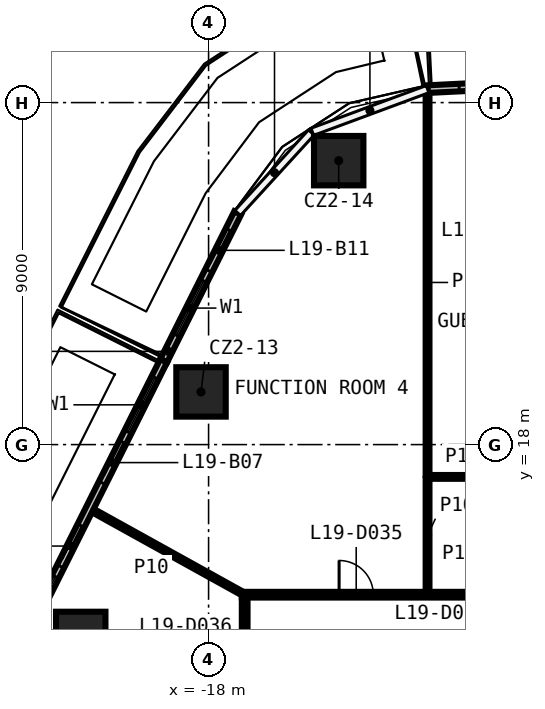
"""IFC4 building model, lengths in metres.
Left out: names, types, materials, properties, quantities, classifications, styles, units other than length and angle.
Written with IfcOpenShell. Run it as: python <this file> out.ifc"""

import sys

from ifc_helpers import new_model, si_unit, direction, frame, frame_2d, origin, origin_2d, place, context, subcontext, project, spatial, rectangle, extrude, element, fill, save


model = new_model("IFC4")
c1 = context("Model", 3, precision=1e-05, world=origin(), true_north=direction((0.0, 1.0)))
c2 = subcontext(c1, "Body", "Model", "MODEL_VIEW")
j1 = project(units=[si_unit("LENGTHUNIT", "METRE"), si_unit("PLANEANGLEUNIT", "RADIAN")], contexts=[c1])
p1 = place(None, origin())
s1 = spatial("IfcSite", under=j1, at=p1, CompositionType="ELEMENT")
p2 = place(p1, origin())
s2 = spatial("IfcBuilding", under=s1, at=p2, CompositionType="ELEMENT")
p3 = place(p2, frame((0.0, 0.0, 95.2)))
s3 = spatial("IfcBuildingStorey", under=s2, at=p3, CompositionType="ELEMENT", Elevation=95.2)
for number, where, z_axis, x_axis in (
    (1, (-21.364, 12.952, 0.0), (0.0, 0.0, 1.0), (1.0, 0.0, 0.0)),
    (2, (-18.199, 19.386, 0.0), (0.0, 0.0, 1.0), (1.0, 0.0, 0.0)),
    (3, (-14.576, 25.472, 0.0), (0.0, 0.0, 1.0), (1.0, 0.0, 0.0)),
):
    element("IfcColumn", number, at=place(p3, frame(where, z_axis=z_axis, x_axis=x_axis)), inside=s3, PredefinedType="COLUMN", context=c2, shape_type="SweptSolid", body=[
        extrude(rectangle(XDim=1.3, YDim=1.3, at=origin_2d()), origin(), (0.0, 0.0, 1.0), 3.25),
    ])
p4 = place(p3, frame((-17.125, 14.05, 0.0), z_axis=(0.0, 0.0, 1.0), x_axis=(1.0, 0.0, 0.0)))
e4 = element("IfcWall", 4, at=p4, inside=s3, PredefinedType="PARTITIONING", context=c2, shape_type="SweptSolid", body=[
    extrude(rectangle(XDim=34.25, YDim=0.15, at=frame_2d((17.125, 0.0))), origin(), (0.0, 0.0, 1.0), 3.25),
])
p5 = place(p4, frame((29.757, 0.0, 0.0)))
e5 = element("IfcOpeningElement", 5, at=p5, cuts=e4, PredefinedType="OPENING", context=c2, shape_type="SweptSolid", body=[
    extrude(rectangle(XDim=1.0, YDim=2.1, at=frame_2d((0.5, 1.05))), frame((0.0, 0.085, 0.0), z_axis=(0.0, -1.0, 0.0), x_axis=(1.0, 0.0, 0.0)), (0.0, 0.0, 1.0), 0.17),
])
p6 = place(p4, frame((18.682, 0.0, 0.0)))
e6 = element("IfcOpeningElement", 6, at=p6, cuts=e4, PredefinedType="OPENING", context=c2, shape_type="SweptSolid", body=[
    extrude(rectangle(XDim=1.0, YDim=2.1, at=frame_2d((0.5, 1.05))), frame((0.0, 0.085, 0.0), z_axis=(0.0, -1.0, 0.0), x_axis=(1.0, 0.0, 0.0)), (0.0, 0.0, 1.0), 0.17),
])
p7 = place(p4, frame((16.654, 0.0, 0.0)))
e7 = element("IfcOpeningElement", 7, at=p7, cuts=e4, PredefinedType="OPENING", context=c2, shape_type="SweptSolid", body=[
    extrude(rectangle(XDim=1.0, YDim=2.1, at=frame_2d((0.5, 1.05))), frame((0.0, 0.085, 0.0), z_axis=(0.0, -1.0, 0.0), x_axis=(1.0, 0.0, 0.0)), (0.0, 0.0, 1.0), 0.17),
])
p8 = place(p4, frame((9.827, 0.0, 0.0)))
e8 = element("IfcOpeningElement", 8, at=p8, cuts=e4, PredefinedType="OPENING", context=c2, shape_type="SweptSolid", body=[
    extrude(rectangle(XDim=1.0, YDim=2.1, at=frame_2d((0.5, 1.05))), frame((0.0, 0.085, 0.0), z_axis=(0.0, -1.0, 0.0), x_axis=(1.0, 0.0, 0.0)), (0.0, 0.0, 1.0), 0.17),
])
p9 = place(p4, frame((7.8, 0.0, 0.0)))
e9 = element("IfcOpeningElement", 9, at=p9, cuts=e4, PredefinedType="OPENING", context=c2, shape_type="SweptSolid", body=[
    extrude(rectangle(XDim=1.0, YDim=2.1, at=frame_2d((0.5, 1.05))), frame((0.0, 0.085, 0.0), z_axis=(0.0, -1.0, 0.0), x_axis=(1.0, 0.0, 0.0)), (0.0, 0.0, 1.0), 0.17),
])
p10 = place(p4, frame((2.56, 0.0, 0.0)))
e10 = element("IfcOpeningElement", 10, at=p10, cuts=e4, PredefinedType="OPENING", context=c2, shape_type="SweptSolid", body=[
    extrude(rectangle(XDim=0.9, YDim=2.1, at=frame_2d((0.45, 1.05))), frame((0.0, 0.085, 0.0), z_axis=(0.0, -1.0, 0.0), x_axis=(1.0, 0.0, 0.0)), (0.0, 0.0, 1.0), 0.17),
])
p11 = place(p3, frame((-12.238, 17.15, 0.0), z_axis=(0.0, 0.0, 1.0), x_axis=(1.0, 0.0, 0.0)))
e11 = element("IfcWall", 11, at=p11, inside=s3, PredefinedType="PARTITIONING", context=c2, shape_type="SweptSolid", body=[
    extrude(rectangle(XDim=2.45, YDim=0.1, at=frame_2d((1.225, 0.0))), origin(), (0.0, 0.0, 1.0), 3.25),
])
p12 = place(p3, frame((-12.238, 14.125, 0.0), z_axis=(0.0, 0.0, 1.0), x_axis=(0.0, 1.0, 0.0)))
e12 = element("IfcWall", 12, at=p12, inside=s3, PredefinedType="PARTITIONING", context=c2, shape_type="SweptSolid", body=[
    extrude(rectangle(XDim=2.975, YDim=0.1, at=frame_2d((1.488, 0.0))), origin(), (0.0, 0.0, 1.0), 3.25),
])
p13 = place(p3, frame((-12.238, 17.2, 0.0), z_axis=(0.0, 0.0, 1.0), x_axis=(0.0, 1.0, 0.0)))
e13 = element("IfcWall", 13, at=p13, inside=s3, PredefinedType="PARTITIONING", context=c2, shape_type="SweptSolid", body=[
    extrude(rectangle(XDim=10.133, YDim=0.1, at=frame_2d((5.067, 0.0))), origin(), (0.0, 0.0, 1.0), 3.25),
])
p14 = place(p3, frame((-17.05, -13.975, 0.0), z_axis=(0.0, 0.0, 1.0), x_axis=(0.0, 1.0, 0.0)))
e14 = element("IfcWall", 14, at=p14, inside=s3, PredefinedType="PARTITIONING", context=c2, shape_type="SweptSolid", body=[
    extrude(rectangle(XDim=27.95, YDim=0.15, at=frame_2d((13.975, 0.0))), origin(), (0.0, 0.0, 1.0), 3.25),
])
p15 = place(p14, frame((11.195, 0.0, 0.0)))
e15 = element("IfcOpeningElement", 15, at=p15, cuts=e14, PredefinedType="OPENING", context=c2, shape_type="SweptSolid", body=[
    extrude(rectangle(XDim=0.9, YDim=2.1, at=frame_2d((0.45, 1.05))), frame((0.0, 0.085, 0.0), z_axis=(0.0, -1.0, 0.0), x_axis=(1.0, 0.0, 0.0)), (0.0, 0.0, 1.0), 0.17),
])
p16 = place(p14, frame((8.57, 0.0, 0.0)))
e16 = element("IfcOpeningElement", 16, at=p16, cuts=e14, PredefinedType="OPENING", context=c2, shape_type="SweptSolid", body=[
    extrude(rectangle(XDim=0.9, YDim=2.1, at=frame_2d((0.45, 1.05))), frame((0.0, 0.085, 0.0), z_axis=(0.0, -1.0, 0.0), x_axis=(1.0, 0.0, 0.0)), (0.0, 0.0, 1.0), 0.17),
])
p17 = place(p14, frame((1.956, 0.0, 0.0)))
e17 = element("IfcOpeningElement", 17, at=p17, cuts=e14, PredefinedType="OPENING", context=c2, shape_type="SweptSolid", body=[
    extrude(rectangle(XDim=0.9, YDim=2.1, at=frame_2d((0.45, 1.05))), frame((0.0, 0.085, 0.0), z_axis=(0.0, -1.0, 0.0), x_axis=(1.0, 0.0, 0.0)), (0.0, 0.0, 1.0), 0.17),
])
p18 = place(p14, frame((25.181, 0.0, 0.0)))
e18 = element("IfcOpeningElement", 18, at=p18, cuts=e14, PredefinedType="OPENING", context=c2, shape_type="SweptSolid", body=[
    extrude(rectangle(XDim=0.9, YDim=2.1, at=frame_2d((0.45, 1.05))), frame((0.0, 0.085, 0.0), z_axis=(0.0, -1.0, 0.0), x_axis=(1.0, 0.0, 0.0)), (0.0, 0.0, 1.0), 0.17),
])
p19 = place(p14, frame((20.101, 0.0, 0.0)))
e19 = element("IfcOpeningElement", 19, at=p19, cuts=e14, PredefinedType="OPENING", context=c2, shape_type="SweptSolid", body=[
    extrude(rectangle(XDim=0.9, YDim=2.1, at=frame_2d((0.45, 1.05))), frame((0.0, 0.085, 0.0), z_axis=(0.0, -1.0, 0.0), x_axis=(1.0, 0.0, 0.0)), (0.0, 0.0, 1.0), 0.17),
])
p20 = place(p14, frame((16.206, 0.0, 0.0)))
e20 = element("IfcOpeningElement", 20, at=p20, cuts=e14, PredefinedType="OPENING", context=c2, shape_type="SweptSolid", body=[
    extrude(rectangle(XDim=0.9, YDim=2.1, at=frame_2d((0.45, 1.05))), frame((0.0, 0.085, 0.0), z_axis=(0.0, -1.0, 0.0), x_axis=(1.0, 0.0, 0.0)), (0.0, 0.0, 1.0), 0.17),
])
p21 = place(p3, frame((-21.115, 16.303, 0.0), z_axis=(0.0, 0.0, 1.0), x_axis=(0.874615252971, -0.484817655692, 0.0)))
e21 = element("IfcWall", 21, at=p21, inside=s3, PredefinedType="PARTITIONING", context=c2, shape_type="SweptSolid", body=[
    extrude(rectangle(XDim=4.648, YDim=0.1, at=frame_2d((2.324, 0.0))), origin(), (0.0, 0.0, 1.0), 3.25),
])
p22 = place(p3, frame((1.042, 28.012, 0.0), z_axis=(0.0, 0.0, 1.0), x_axis=(-0.998772222794, -0.049538338427, 0.0)))
e22 = element("IfcWall", 22, at=p22, inside=s3, PredefinedType="SOLIDWALL", context=c2, shape_type="SweptSolid", body=[
    extrude(rectangle(XDim=13.297, YDim=0.2, at=frame_2d((6.648, 0.0))), origin(), (0.0, 0.0, 1.0), 3.25),
])
p23 = place(p22, frame((2.0, 0.0, 0.6)))
e23 = element("IfcOpeningElement", 23, at=p23, cuts=e22, PredefinedType="OPENING", context=c2, shape_type="SweptSolid", body=[
    extrude(rectangle(XDim=1.6, YDim=2.4, at=frame_2d((0.8, 1.2))), frame((0.0, 0.11, 0.0), z_axis=(0.0, -1.0, 0.0), x_axis=(1.0, 0.0, 0.0)), (0.0, 0.0, 1.0), 0.22),
])
p24 = place(p22, frame((0.5, 0.0, 0.0)))
e24 = element("IfcOpeningElement", 24, at=p24, cuts=e22, PredefinedType="OPENING", context=c2, shape_type="SweptSolid", body=[
    extrude(rectangle(XDim=1.2, YDim=2.4, at=frame_2d((0.6, 1.2))), frame((0.0, 0.11, 0.0), z_axis=(0.0, -1.0, 0.0), x_axis=(1.0, 0.0, 0.0)), (0.0, 0.0, 1.0), 0.22),
])
p25 = place(p22, frame((6.432, 0.0, 0.6)))
e25 = element("IfcOpeningElement", 25, at=p25, cuts=e22, PredefinedType="OPENING", context=c2, shape_type="SweptSolid", body=[
    extrude(rectangle(XDim=1.6, YDim=2.4, at=frame_2d((0.8, 1.2))), frame((0.0, 0.11, 0.0), z_axis=(0.0, -1.0, 0.0), x_axis=(1.0, 0.0, 0.0)), (0.0, 0.0, 1.0), 0.22),
])
p26 = place(p22, frame((4.932, 0.0, 0.0)))
e26 = element("IfcOpeningElement", 26, at=p26, cuts=e22, PredefinedType="OPENING", context=c2, shape_type="SweptSolid", body=[
    extrude(rectangle(XDim=1.2, YDim=2.4, at=frame_2d((0.6, 1.2))), frame((0.0, 0.11, 0.0), z_axis=(0.0, -1.0, 0.0), x_axis=(1.0, 0.0, 0.0)), (0.0, 0.0, 1.0), 0.22),
])
p27 = place(p22, frame((9.365, 0.0, 0.6)))
e27 = element("IfcOpeningElement", 27, at=p27, cuts=e22, PredefinedType="OPENING", context=c2, shape_type="SweptSolid", body=[
    extrude(rectangle(XDim=1.6, YDim=2.4, at=frame_2d((0.8, 1.2))), frame((0.0, 0.11, 0.0), z_axis=(0.0, -1.0, 0.0), x_axis=(1.0, 0.0, 0.0)), (0.0, 0.0, 1.0), 0.22),
])
p28 = place(p22, frame((11.264, 0.0, 0.0)))
e28 = element("IfcOpeningElement", 28, at=p28, cuts=e22, PredefinedType="OPENING", context=c2, shape_type="SweptSolid", body=[
    extrude(rectangle(XDim=1.2, YDim=2.4, at=frame_2d((0.6, 1.2))), frame((0.0, 0.11, 0.0), z_axis=(0.0, -1.0, 0.0), x_axis=(1.0, 0.0, 0.0)), (0.0, 0.0, 1.0), 0.22),
])
p29 = place(p3, frame((-19.181, 20.208, 0.0), z_axis=(0.0, 0.0, 1.0), x_axis=(-0.447953166305, -0.894057023236, 0.0)))
e29 = element("IfcWall", 29, at=p29, inside=s3, PredefinedType="SOLIDWALL", context=c2, shape_type="SweptSolid", body=[
    extrude(rectangle(XDim=17.426, YDim=0.2, at=frame_2d((8.713, 0.0))), origin(), (0.0, 0.0, 1.0), 3.25),
])
p30 = place(p29, frame((0.5, 0.0, 0.6)))
e30 = element("IfcOpeningElement", 30, at=p30, cuts=e29, PredefinedType="OPENING", context=c2, shape_type="SweptSolid", body=[
    extrude(rectangle(XDim=1.6, YDim=2.4, at=frame_2d((0.8, 1.2))), frame((0.0, 0.11, 0.0), z_axis=(0.0, -1.0, 0.0), x_axis=(1.0, 0.0, 0.0)), (0.0, 0.0, 1.0), 0.22),
])
p31 = place(p29, frame((2.4, 0.0, 0.0)))
e31 = element("IfcOpeningElement", 31, at=p31, cuts=e29, PredefinedType="OPENING", context=c2, shape_type="SweptSolid", body=[
    extrude(rectangle(XDim=1.2, YDim=2.4, at=frame_2d((0.6, 1.2))), frame((0.0, 0.11, 0.0), z_axis=(0.0, -1.0, 0.0), x_axis=(1.0, 0.0, 0.0)), (0.0, 0.0, 1.0), 0.22),
])
p32 = place(p29, frame((6.357, 0.0, 0.6)))
e32 = element("IfcOpeningElement", 32, at=p32, cuts=e29, PredefinedType="OPENING", context=c2, shape_type="SweptSolid", body=[
    extrude(rectangle(XDim=1.6, YDim=2.4, at=frame_2d((0.8, 1.2))), frame((0.0, 0.11, 0.0), z_axis=(0.0, -1.0, 0.0), x_axis=(1.0, 0.0, 0.0)), (0.0, 0.0, 1.0), 0.22),
])
p33 = place(p29, frame((4.857, 0.0, 0.0)))
e33 = element("IfcOpeningElement", 33, at=p33, cuts=e29, PredefinedType="OPENING", context=c2, shape_type="SweptSolid", body=[
    extrude(rectangle(XDim=1.2, YDim=2.4, at=frame_2d((0.6, 1.2))), frame((0.0, 0.11, 0.0), z_axis=(0.0, -1.0, 0.0), x_axis=(1.0, 0.0, 0.0)), (0.0, 0.0, 1.0), 0.22),
])
p34 = place(p29, frame((10.713, 0.0, 0.6)))
e34 = element("IfcOpeningElement", 34, at=p34, cuts=e29, PredefinedType="OPENING", context=c2, shape_type="SweptSolid", body=[
    extrude(rectangle(XDim=1.6, YDim=2.4, at=frame_2d((0.8, 1.2))), frame((0.0, 0.11, 0.0), z_axis=(0.0, -1.0, 0.0), x_axis=(1.0, 0.0, 0.0)), (0.0, 0.0, 1.0), 0.22),
])
p35 = place(p29, frame((9.213, 0.0, 0.0)))
e35 = element("IfcOpeningElement", 35, at=p35, cuts=e29, PredefinedType="OPENING", context=c2, shape_type="SweptSolid", body=[
    extrude(rectangle(XDim=1.2, YDim=2.4, at=frame_2d((0.6, 1.2))), frame((0.0, 0.11, 0.0), z_axis=(0.0, -1.0, 0.0), x_axis=(1.0, 0.0, 0.0)), (0.0, 0.0, 1.0), 0.22),
])
p36 = place(p29, frame((13.57, 0.0, 0.6)))
e36 = element("IfcOpeningElement", 36, at=p36, cuts=e29, PredefinedType="OPENING", context=c2, shape_type="SweptSolid", body=[
    extrude(rectangle(XDim=1.6, YDim=2.4, at=frame_2d((0.8, 1.2))), frame((0.0, 0.11, 0.0), z_axis=(0.0, -1.0, 0.0), x_axis=(1.0, 0.0, 0.0)), (0.0, 0.0, 1.0), 0.22),
])
p37 = place(p29, frame((15.67, 0.0, 0.0)))
e37 = element("IfcOpeningElement", 37, at=p37, cuts=e29, PredefinedType="OPENING", context=c2, shape_type="SweptSolid", body=[
    extrude(rectangle(XDim=1.2, YDim=2.4, at=frame_2d((0.6, 1.2))), frame((0.0, 0.11, 0.0), z_axis=(0.0, -1.0, 0.0), x_axis=(1.0, 0.0, 0.0)), (0.0, 0.0, 1.0), 0.22),
])
p38 = place(p3, frame((-17.233, 24.096, 0.0), z_axis=(0.0, 0.0, 1.0), x_axis=(-0.447977093624, -0.89404503443, 0.0)))
e38 = element("IfcWall", 38, at=p38, inside=s3, PredefinedType="SOLIDWALL", context=c2, shape_type="SweptSolid", body=[
    extrude(rectangle(XDim=4.348, YDim=0.2, at=frame_2d((2.174, 0.0))), origin(), (0.0, 0.0, 1.0), 3.25),
])
p39 = place(p38, frame((2.0, 0.0, 0.6)))
e39 = element("IfcOpeningElement", 39, at=p39, cuts=e38, PredefinedType="OPENING", context=c2, shape_type="SweptSolid", body=[
    extrude(rectangle(XDim=1.6, YDim=2.4, at=frame_2d((0.8, 1.2))), frame((0.0, 0.11, 0.0), z_axis=(0.0, -1.0, 0.0), x_axis=(1.0, 0.0, 0.0)), (0.0, 0.0, 1.0), 0.22),
])
p40 = place(p38, frame((0.5, 0.0, 0.0)))
e40 = element("IfcOpeningElement", 40, at=p40, cuts=e38, PredefinedType="OPENING", context=c2, shape_type="SweptSolid", body=[
    extrude(rectangle(XDim=1.2, YDim=2.4, at=frame_2d((0.6, 1.2))), frame((0.0, 0.11, 0.0), z_axis=(0.0, -1.0, 0.0), x_axis=(1.0, 0.0, 0.0)), (0.0, 0.0, 1.0), 0.22),
])
p41 = place(p10, origin())
e41 = element("IfcDoor", 41, at=p41, inside=s3, OperationType="SINGLE_SWING_RIGHT", PredefinedType="DOOR", context=c2, shape_type="SweptSolid", body=[
    extrude(rectangle(XDim=0.9, YDim=2.1, at=frame_2d((0.45, 1.05))), frame((0.0, 0.025, 0.0), z_axis=(0.0, -1.0, 0.0), x_axis=(1.0, 0.0, 0.0)), (0.0, 0.0, 1.0), 0.05),
])
fill(e10, e41)
p42 = place(p28, origin())
e42 = element("IfcDoor", 42, at=p42, inside=s3, OperationType="SLIDING_TO_LEFT", PredefinedType="DOOR", context=c2, shape_type="SweptSolid", body=[
    extrude(rectangle(XDim=1.2, YDim=2.4, at=frame_2d((0.6, 1.2))), frame((0.0, 0.025, 0.0), z_axis=(0.0, -1.0, 0.0), x_axis=(1.0, 0.0, 0.0)), (0.0, 0.0, 1.0), 0.05),
])
fill(e28, e42)
p43 = place(p30, origin())
e43 = element("IfcWindow", 43, at=p43, inside=s3, PartitioningType="SINGLE_PANEL", PredefinedType="WINDOW", context=c2, shape_type="SweptSolid", body=[
    extrude(rectangle(XDim=1.6, YDim=2.4, at=frame_2d((0.8, 1.2))), frame((0.0, 0.03, 0.0), z_axis=(0.0, -1.0, 0.0), x_axis=(1.0, 0.0, 0.0)), (0.0, 0.0, 1.0), 0.06),
])
fill(e30, e43)
p44 = place(p31, origin())
e44 = element("IfcDoor", 44, at=p44, inside=s3, OperationType="SLIDING_TO_LEFT", PredefinedType="DOOR", context=c2, shape_type="SweptSolid", body=[
    extrude(rectangle(XDim=1.2, YDim=2.4, at=frame_2d((0.6, 1.2))), frame((0.0, 0.025, 0.0), z_axis=(0.0, -1.0, 0.0), x_axis=(1.0, 0.0, 0.0)), (0.0, 0.0, 1.0), 0.05),
])
fill(e31, e44)
p45 = place(p32, origin())
e45 = element("IfcWindow", 45, at=p45, inside=s3, PartitioningType="SINGLE_PANEL", PredefinedType="WINDOW", context=c2, shape_type="SweptSolid", body=[
    extrude(rectangle(XDim=1.6, YDim=2.4, at=frame_2d((0.8, 1.2))), frame((0.0, 0.03, 0.0), z_axis=(0.0, -1.0, 0.0), x_axis=(1.0, 0.0, 0.0)), (0.0, 0.0, 1.0), 0.06),
])
fill(e32, e45)
p46 = place(p33, origin())
e46 = element("IfcDoor", 46, at=p46, inside=s3, OperationType="SLIDING_TO_LEFT", PredefinedType="DOOR", context=c2, shape_type="SweptSolid", body=[
    extrude(rectangle(XDim=1.2, YDim=2.4, at=frame_2d((0.6, 1.2))), frame((0.0, 0.025, 0.0), z_axis=(0.0, -1.0, 0.0), x_axis=(1.0, 0.0, 0.0)), (0.0, 0.0, 1.0), 0.05),
])
fill(e33, e46)
p47 = place(p39, origin())
e47 = element("IfcWindow", 47, at=p47, inside=s3, PartitioningType="SINGLE_PANEL", PredefinedType="WINDOW", context=c2, shape_type="SweptSolid", body=[
    extrude(rectangle(XDim=1.6, YDim=2.4, at=frame_2d((0.8, 1.2))), frame((0.0, 0.03, 0.0), z_axis=(0.0, -1.0, 0.0), x_axis=(1.0, 0.0, 0.0)), (0.0, 0.0, 1.0), 0.06),
])
fill(e39, e47)
p48 = place(p40, origin())
e48 = element("IfcDoor", 48, at=p48, inside=s3, OperationType="SLIDING_TO_LEFT", PredefinedType="DOOR", context=c2, shape_type="SweptSolid", body=[
    extrude(rectangle(XDim=1.2, YDim=2.4, at=frame_2d((0.6, 1.2))), frame((0.0, 0.025, 0.0), z_axis=(0.0, -1.0, 0.0), x_axis=(1.0, 0.0, 0.0)), (0.0, 0.0, 1.0), 0.05),
])
fill(e40, e48)
save(model, sys.argv[1])
